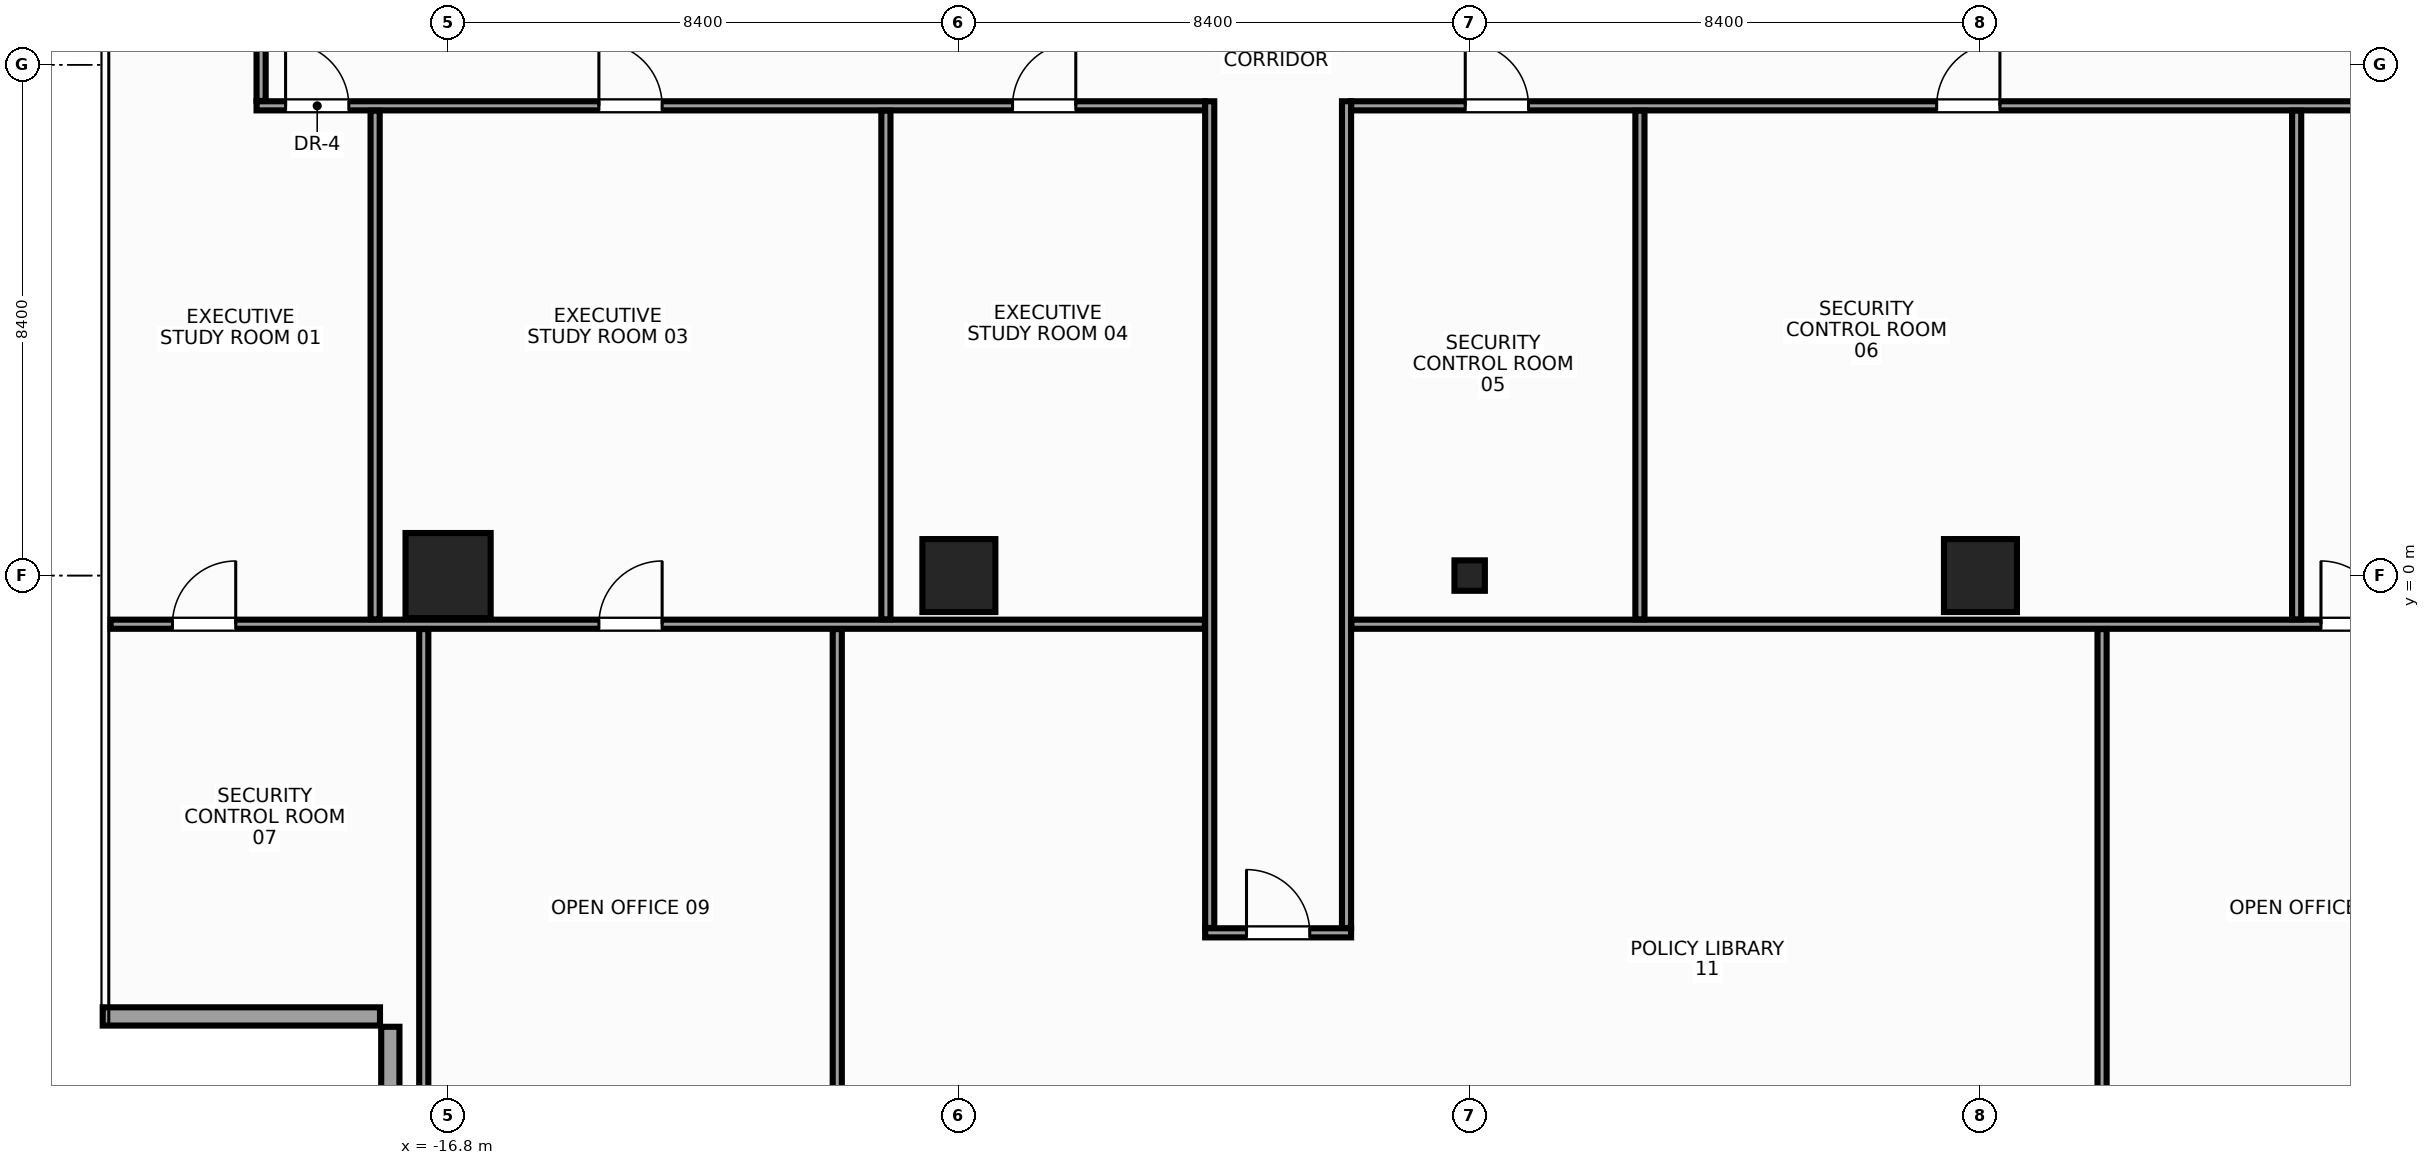
"""IFC4 building model, lengths in metres.
Left out: names, types, materials, properties, quantities, classifications, styles, units other than length and angle.
Written with IfcOpenShell. Run it as: python <this file> out.ifc"""

import sys

from ifc_helpers import new_model, si_unit, direction, frame, frame_2d, origin, origin_with_axes, origin_2d, place, context, subcontext, project, spatial, rectangle, hollow_rectangle, extrude, source, transform, mapped, element, fill, save


model = new_model("IFC4")
c1 = context("Model", 3, precision=1e-05, world=origin(), true_north=direction((0.0, 1.0)))
c2 = subcontext(c1, "Body", "Model", "MODEL_VIEW")
j1 = project(units=[si_unit("LENGTHUNIT", "METRE"), si_unit("PLANEANGLEUNIT", "RADIAN")], contexts=[c1])
p1 = place(None, origin())
s1 = spatial("IfcSite", under=j1, at=p1, CompositionType="ELEMENT")
p2 = place(p1, origin())
s2 = spatial("IfcBuilding", under=s1, at=p2, CompositionType="ELEMENT")
p3 = place(p2, frame((0.0, 0.0, 250.4)))
s3 = spatial("IfcBuildingStorey", under=s2, at=p3, CompositionType="ELEMENT", Elevation=250.4)
m1 = source(origin(), c2, "Body", "SweptSolid", [
    extrude(rectangle(XDim=1.4, YDim=1.4, at=origin_2d()), origin(), (0.0, 0.0, 1.0), 3.6),
])
p4 = place(p3, frame((-16.8, 0.0, 0.0), z_axis=(0.0, 0.0, 1.0), x_axis=(1.0, 0.0, 0.0)))
e1 = element("IfcColumn", 1, at=p4, inside=s3, PredefinedType="COLUMN", context=c2, shape_type="MappedRepresentation", body=[
    mapped(m1, transform((0.0, 0.0, 0.0), x_axis=(1.0, 0.0, 0.0), y_axis=(0.0, 1.0, 0.0), z_axis=(0.0, 0.0, 1.0), scale=1.0)),
])
m2 = source(origin(), c2, "Body", "SweptSolid", [
    extrude(rectangle(XDim=1.2, YDim=1.2, at=origin_2d()), origin(), (0.0, 0.0, 1.0), 3.6),
])
for number, where, z_axis, x_axis in (
    (2, (-8.4, 0.0, 0.0), (0.0, 0.0, 1.0), (1.0, 0.0, 0.0)),
    (3, (8.4, 0.0, 0.0), (0.0, 0.0, 1.0), (1.0, 0.0, 0.0)),
):
    element("IfcColumn", number, at=place(p3, frame(where, z_axis=z_axis, x_axis=x_axis)), inside=s3, PredefinedType="COLUMN", context=c2, shape_type="MappedRepresentation", body=[
        mapped(m2, transform((0.0, 0.0, 0.0), x_axis=(1.0, 0.0, 0.0), y_axis=(0.0, 1.0, 0.0), z_axis=(0.0, 0.0, 1.0), scale=1.0)),
    ])
m3 = source(origin(), c2, "Body", "SweptSolid", [
    extrude(hollow_rectangle(XDim=0.5, YDim=0.5, WallThickness=0.025, at=origin_2d()), origin(), (0.0, 0.0, 1.0), 3.6),
])
p5 = place(p3, origin_with_axes())
e4 = element("IfcColumn", 4, at=p5, inside=s3, PredefinedType="COLUMN", context=c2, shape_type="MappedRepresentation", body=[
    mapped(m3, transform((0.0, 0.0, 0.0), x_axis=(1.0, 0.0, 0.0), y_axis=(0.0, 1.0, 0.0), z_axis=(0.0, 0.0, 1.0), scale=1.0)),
])
m4 = source(origin(), c2, "Body", "SweptSolid", [
    extrude(rectangle(XDim=4.56, YDim=0.3, at=frame_2d((2.28, 0.0))), origin(), (0.0, 0.0, 1.0), 2.75),
])
for number, where, z_axis, x_axis in (
    (5, (-22.48, -7.25, 0.0), (0.0, 0.0, 1.0), (1.0, 0.0, 0.0)),
    (6, (-17.75, -7.42, 0.0), (0.0, 0.0, 1.0), (0.0, -1.0, 0.0)),
):
    element("IfcWall", number, at=place(p3, frame(where, z_axis=z_axis, x_axis=x_axis)), inside=s3, PredefinedType="STANDARD", context=c2, shape_type="MappedRepresentation", body=[
        mapped(m4, transform((0.0, 0.0, 0.0), x_axis=(1.0, 0.0, 0.0), y_axis=(0.0, 1.0, 0.0), z_axis=(0.0, 0.0, 1.0), scale=1.0)),
    ])
m5 = source(origin(), c2, "Body", "SweptSolid", [
    extrude(rectangle(XDim=15.6, YDim=0.15, at=frame_2d((7.8, 0.0))), origin(), (0.0, 0.0, 1.0), 2.755),
])
p6 = place(p3, frame((-19.95, 7.725, 0.0), z_axis=(0.0, 0.0, 1.0), x_axis=(1.0, 0.0, 0.0)))
e7 = element("IfcWall", 7, at=p6, inside=s3, PredefinedType="PARTITIONING", context=c2, shape_type="MappedRepresentation", body=[
    mapped(m5, transform((0.0, 0.0, 0.0), x_axis=(1.0, 0.0, 0.0), y_axis=(0.0, 1.0, 0.0), z_axis=(0.0, 0.0, 1.0), scale=1.0)),
])
p7 = place(p6, frame((0.478, 0.0, 0.0)))
e8 = element("IfcOpeningElement", 8, at=p7, cuts=e7, PredefinedType="OPENING", context=c2, shape_type="SweptSolid", body=[
    extrude(rectangle(XDim=1.04, YDim=2.2, at=frame_2d((0.52, 1.1))), frame((0.0, 0.087, 0.0), z_axis=(0.0, -1.0, 0.0), x_axis=(1.0, 0.0, 0.0)), (0.0, 0.0, 1.0), 0.174),
])
p8 = place(p6, frame((5.63, 0.0, 0.0)))
e9 = element("IfcOpeningElement", 9, at=p8, cuts=e7, PredefinedType="OPENING", context=c2, shape_type="SweptSolid", body=[
    extrude(rectangle(XDim=1.04, YDim=2.2, at=frame_2d((0.52, 1.1))), frame((0.0, 0.087, 0.0), z_axis=(0.0, -1.0, 0.0), x_axis=(1.0, 0.0, 0.0)), (0.0, 0.0, 1.0), 0.174),
])
p9 = place(p6, frame((12.433, 0.0, 0.0)))
e10 = element("IfcOpeningElement", 10, at=p9, cuts=e7, PredefinedType="OPENING", context=c2, shape_type="SweptSolid", body=[
    extrude(rectangle(XDim=1.04, YDim=2.2, at=frame_2d((0.52, 1.1))), frame((0.0, 0.087, 0.0), z_axis=(0.0, -1.0, 0.0), x_axis=(1.0, 0.0, 0.0)), (0.0, 0.0, 1.0), 0.174),
])
m6 = source(origin(), c2, "Body", "SweptSolid", [
    extrude(rectangle(XDim=21.9, YDim=0.15, at=frame_2d((10.95, 0.0))), origin(), (0.0, 0.0, 1.0), 2.755),
])
p10 = place(p3, frame((-1.95, 7.725, 0.0), z_axis=(0.0, 0.0, 1.0), x_axis=(1.0, 0.0, 0.0)))
e11 = element("IfcWall", 11, at=p10, inside=s3, PredefinedType="PARTITIONING", context=c2, shape_type="MappedRepresentation", body=[
    mapped(m6, transform((0.0, 0.0, 0.0), x_axis=(1.0, 0.0, 0.0), y_axis=(0.0, 1.0, 0.0), z_axis=(0.0, 0.0, 1.0), scale=1.0)),
])
p11 = place(p10, frame((17.742, 0.0, 0.0)))
e12 = element("IfcOpeningElement", 12, at=p11, cuts=e11, PredefinedType="OPENING", context=c2, shape_type="SweptSolid", body=[
    extrude(rectangle(XDim=1.04, YDim=2.2, at=frame_2d((0.52, 1.1))), frame((0.0, 0.087, 0.0), z_axis=(0.0, -1.0, 0.0), x_axis=(1.0, 0.0, 0.0)), (0.0, 0.0, 1.0), 0.174),
])
p12 = place(p10, frame((1.877, 0.0, 0.0)))
e13 = element("IfcOpeningElement", 13, at=p12, cuts=e11, PredefinedType="OPENING", context=c2, shape_type="SweptSolid", body=[
    extrude(rectangle(XDim=1.04, YDim=2.2, at=frame_2d((0.52, 1.1))), frame((0.0, 0.087, 0.0), z_axis=(0.0, -1.0, 0.0), x_axis=(1.0, 0.0, 0.0)), (0.0, 0.0, 1.0), 0.174),
])
p13 = place(p10, frame((9.63, 0.0, 0.0)))
e14 = element("IfcOpeningElement", 14, at=p13, cuts=e11, PredefinedType="OPENING", context=c2, shape_type="SweptSolid", body=[
    extrude(rectangle(XDim=1.04, YDim=2.2, at=frame_2d((0.52, 1.1))), frame((0.0, 0.087, 0.0), z_axis=(0.0, -1.0, 0.0), x_axis=(1.0, 0.0, 0.0)), (0.0, 0.0, 1.0), 0.174),
])
m7 = source(origin(), c2, "Body", "SweptSolid", [
    extrude(rectangle(XDim=2.4, YDim=0.15, at=frame_2d((1.2, 0.0))), origin(), (0.0, 0.0, 1.0), 3.37),
])
p14 = place(p3, frame((-4.35, -5.875, 0.0), z_axis=(0.0, 0.0, 1.0), x_axis=(1.0, 0.0, 0.0)))
e15 = element("IfcWall", 15, at=p14, inside=s3, PredefinedType="PARTITIONING", context=c2, shape_type="MappedRepresentation", body=[
    mapped(m7, transform((0.0, 0.0, 0.0), x_axis=(1.0, 0.0, 0.0), y_axis=(0.0, 1.0, 0.0), z_axis=(0.0, 0.0, 1.0), scale=1.0)),
])
p15 = place(p14, frame((0.68, 0.0, 0.0)))
e16 = element("IfcOpeningElement", 16, at=p15, cuts=e15, PredefinedType="OPENING", context=c2, shape_type="SweptSolid", body=[
    extrude(rectangle(XDim=1.04, YDim=2.2, at=frame_2d((0.52, 1.1))), frame((0.0, 0.087, 0.0), z_axis=(0.0, -1.0, 0.0), x_axis=(1.0, 0.0, 0.0)), (0.0, 0.0, 1.0), 0.174),
])
m8 = source(origin(), c2, "Body", "SweptSolid", [
    extrude(rectangle(XDim=2.115, YDim=0.15, at=frame_2d((1.058, 0.0))), origin(), (0.0, 0.0, 1.0), 3.37),
])
p16 = place(p3, frame((-19.875, 7.805, 0.0), z_axis=(0.0, 0.0, 1.0), x_axis=(0.0, 1.0, 0.0)))
e17 = element("IfcWall", 17, at=p16, inside=s3, PredefinedType="PARTITIONING", context=c2, shape_type="MappedRepresentation", body=[
    mapped(m8, transform((0.0, 0.0, 0.0), x_axis=(1.0, 0.0, 0.0), y_axis=(0.0, 1.0, 0.0), z_axis=(0.0, 0.0, 1.0), scale=1.0)),
])
m9 = source(origin(), c2, "Body", "SweptSolid", [
    extrude(rectangle(XDim=13.595, YDim=0.15, at=frame_2d((6.797, 0.0))), origin(), (0.0, 0.0, 1.0), 2.655),
])
for number, where, z_axis, x_axis in (
    (18, (-4.275, -5.795, 0.0), (0.0, 0.0, 1.0), (0.0, 1.0, 0.0)),
    (19, (-2.025, -5.795, 0.0), (0.0, 0.0, 1.0), (0.0, 1.0, 0.0)),
):
    element("IfcWall", number, at=place(p3, frame(where, z_axis=z_axis, x_axis=x_axis)), inside=s3, PredefinedType="PARTITIONING", context=c2, shape_type="MappedRepresentation", body=[
        mapped(m9, transform((0.0, 0.0, 0.0), x_axis=(1.0, 0.0, 0.0), y_axis=(0.0, 1.0, 0.0), z_axis=(0.0, 0.0, 1.0), scale=1.0)),
    ])
m10 = source(origin(), c2, "Body", "SweptSolid", [
    extrude(rectangle(XDim=17.995, YDim=0.15, at=frame_2d((8.998, 0.0))), origin(), (0.0, 0.0, 1.0), 2.755),
])
p17 = place(p3, frame((-22.35, -0.8, 0.0), z_axis=(0.0, 0.0, 1.0), x_axis=(1.0, 0.0, 0.0)))
e20 = element("IfcWall", 20, at=p17, inside=s3, PredefinedType="PARTITIONING", context=c2, shape_type="MappedRepresentation", body=[
    mapped(m10, transform((0.0, 0.0, 0.0), x_axis=(1.0, 0.0, 0.0), y_axis=(0.0, 1.0, 0.0), z_axis=(0.0, 0.0, 1.0), scale=1.0)),
])
p18 = place(p17, frame((1.018, 0.0, 0.0)))
e21 = element("IfcOpeningElement", 21, at=p18, cuts=e20, PredefinedType="OPENING", context=c2, shape_type="SweptSolid", body=[
    extrude(rectangle(XDim=1.04, YDim=2.2, at=frame_2d((0.52, 1.1))), frame((0.0, 0.087, 0.0), z_axis=(0.0, -1.0, 0.0), x_axis=(1.0, 0.0, 0.0)), (0.0, 0.0, 1.0), 0.174),
])
p19 = place(p17, frame((8.03, 0.0, 0.0)))
e22 = element("IfcOpeningElement", 22, at=p19, cuts=e20, PredefinedType="OPENING", context=c2, shape_type="SweptSolid", body=[
    extrude(rectangle(XDim=1.04, YDim=2.2, at=frame_2d((0.52, 1.1))), frame((0.0, 0.087, 0.0), z_axis=(0.0, -1.0, 0.0), x_axis=(1.0, 0.0, 0.0)), (0.0, 0.0, 1.0), 0.174),
])
m11 = source(origin(), c2, "Body", "SweptSolid", [
    extrude(rectangle(XDim=24.295, YDim=0.15, at=frame_2d((12.147, 0.0))), origin(), (0.0, 0.0, 1.0), 2.755),
])
p20 = place(p3, frame((-1.945, -0.8, 0.0), z_axis=(0.0, 0.0, 1.0), x_axis=(1.0, 0.0, 0.0)))
e23 = element("IfcWall", 23, at=p20, inside=s3, PredefinedType="PARTITIONING", context=c2, shape_type="MappedRepresentation", body=[
    mapped(m11, transform((0.0, 0.0, 0.0), x_axis=(1.0, 0.0, 0.0), y_axis=(0.0, 1.0, 0.0), z_axis=(0.0, 0.0, 1.0), scale=1.0)),
])
p21 = place(p20, frame((22.278, 0.0, 0.0)))
e24 = element("IfcOpeningElement", 24, at=p21, cuts=e23, PredefinedType="OPENING", context=c2, shape_type="SweptSolid", body=[
    extrude(rectangle(XDim=1.04, YDim=2.2, at=frame_2d((0.52, 1.1))), frame((0.0, 0.087, 0.0), z_axis=(0.0, -1.0, 0.0), x_axis=(1.0, 0.0, 0.0)), (0.0, 0.0, 1.0), 0.174),
])
p22 = place(p20, frame((15.945, 0.0, 0.0)))
e25 = element("IfcOpeningElement", 25, at=p22, cuts=e23, PredefinedType="OPENING", context=c2, shape_type="SweptSolid", body=[
    extrude(rectangle(XDim=1.04, YDim=2.2, at=frame_2d((0.52, 1.1))), frame((0.0, 0.087, 0.0), z_axis=(0.0, -1.0, 0.0), x_axis=(1.0, 0.0, 0.0)), (0.0, 0.0, 1.0), 0.174),
])
m12 = source(origin(), c2, "Body", "SweptSolid", [
    extrude(rectangle(XDim=8.365, YDim=0.15, at=frame_2d((4.183, 0.0))), origin(), (0.0, 0.0, 1.0), 3.37),
])
p23 = place(p3, frame((-18.0, -0.72, 0.0), z_axis=(0.0, 0.0, 1.0), x_axis=(0.0, 1.0, 0.0)))
e26 = element("IfcWall", 26, at=p23, inside=s3, PredefinedType="PARTITIONING", context=c2, shape_type="MappedRepresentation", body=[
    mapped(m12, transform((0.0, 0.0, 0.0), x_axis=(1.0, 0.0, 0.0), y_axis=(0.0, 1.0, 0.0), z_axis=(0.0, 0.0, 1.0), scale=1.0)),
])
m13 = source(origin(), c2, "Body", "SweptSolid", [
    extrude(rectangle(XDim=8.365, YDim=0.15, at=frame_2d((4.183, 0.0))), origin(), (0.0, 0.0, 1.0), 2.655),
])
for number, where, z_axis, x_axis in (
    (27, (-9.6, -0.72, 0.0), (0.0, 0.0, 1.0), (0.0, 1.0, 0.0)),
    (28, (2.8, -0.72, 0.0), (0.0, 0.0, 1.0), (0.0, 1.0, 0.0)),
    (29, (13.6, -0.72, 0.0), (0.0, 0.0, 1.0), (0.0, 1.0, 0.0)),
):
    element("IfcWall", number, at=place(p3, frame(where, z_axis=z_axis, x_axis=x_axis)), inside=s3, PredefinedType="PARTITIONING", context=c2, shape_type="MappedRepresentation", body=[
        mapped(m13, transform((0.0, 0.0, 0.0), x_axis=(1.0, 0.0, 0.0), y_axis=(0.0, 1.0, 0.0), z_axis=(0.0, 0.0, 1.0), scale=1.0)),
    ])
m14 = source(origin(), c2, "Body", "SweptSolid", [
    extrude(rectangle(XDim=9.21, YDim=0.15, at=frame_2d((4.605, 0.0))), origin(), (0.0, 0.0, 1.0), 3.37),
])
p24 = place(p3, frame((-17.2, -10.09, 0.0), z_axis=(0.0, 0.0, 1.0), x_axis=(0.0, 1.0, 0.0)))
e30 = element("IfcWall", 30, at=p24, inside=s3, PredefinedType="PARTITIONING", context=c2, shape_type="MappedRepresentation", body=[
    mapped(m14, transform((0.0, 0.0, 0.0), x_axis=(1.0, 0.0, 0.0), y_axis=(0.0, 1.0, 0.0), z_axis=(0.0, 0.0, 1.0), scale=1.0)),
])
m15 = source(origin(), c2, "Body", "SweptSolid", [
    extrude(rectangle(XDim=10.97, YDim=0.15, at=frame_2d((5.485, 0.0))), origin(), (0.0, 0.0, 1.0), 2.905),
])
for number, where, z_axis, x_axis in (
    (31, (-10.4, -11.85, 0.0), (0.0, 0.0, 1.0), (0.0, 1.0, 0.0)),
    (32, (10.4, -11.85, 0.0), (0.0, 0.0, 1.0), (0.0, 1.0, 0.0)),
):
    element("IfcWall", number, at=place(p3, frame(where, z_axis=z_axis, x_axis=x_axis)), inside=s3, PredefinedType="PARTITIONING", context=c2, shape_type="MappedRepresentation", body=[
        mapped(m15, transform((0.0, 0.0, 0.0), x_axis=(1.0, 0.0, 0.0), y_axis=(0.0, 1.0, 0.0), z_axis=(0.0, 0.0, 1.0), scale=1.0)),
    ])
m16 = source(origin(), c2, "Body", "SweptSolid", [
    extrude(rectangle(XDim=1.04, YDim=2.2, at=frame_2d((0.52, 1.1))), frame((0.0, 0.025, 0.0), z_axis=(0.0, -1.0, 0.0), x_axis=(1.0, 0.0, 0.0)), (0.0, 0.0, 1.0), 0.05),
])
p25 = place(p7, origin())
e33 = element("IfcDoor", 33, at=p25, inside=s3, OperationType="SINGLE_SWING_LEFT", PredefinedType="DOOR", context=c2, shape_type="MappedRepresentation", body=[
    mapped(m16, transform((0.0, 0.0, 0.0), x_axis=(1.0, 0.0, 0.0), y_axis=(0.0, 1.0, 0.0), z_axis=(0.0, 0.0, 1.0), scale=1.0)),
])
fill(e8, e33)
p26 = place(p8, origin())
e34 = element("IfcDoor", 34, at=p26, inside=s3, OperationType="SINGLE_SWING_LEFT", PredefinedType="DOOR", context=c2, shape_type="MappedRepresentation", body=[
    mapped(m16, transform((0.0, 0.0, 0.0), x_axis=(1.0, 0.0, 0.0), y_axis=(0.0, 1.0, 0.0), z_axis=(0.0, 0.0, 1.0), scale=1.0)),
])
fill(e9, e34)
p27 = place(p9, origin())
e35 = element("IfcDoor", 35, at=p27, inside=s3, OperationType="SINGLE_SWING_RIGHT", PredefinedType="DOOR", context=c2, shape_type="MappedRepresentation", body=[
    mapped(m16, transform((0.0, 0.0, 0.0), x_axis=(1.0, 0.0, 0.0), y_axis=(0.0, 1.0, 0.0), z_axis=(0.0, 0.0, 1.0), scale=1.0)),
])
fill(e10, e35)
p28 = place(p12, origin())
e36 = element("IfcDoor", 36, at=p28, inside=s3, OperationType="SINGLE_SWING_LEFT", PredefinedType="DOOR", context=c2, shape_type="MappedRepresentation", body=[
    mapped(m16, transform((0.0, 0.0, 0.0), x_axis=(1.0, 0.0, 0.0), y_axis=(0.0, 1.0, 0.0), z_axis=(0.0, 0.0, 1.0), scale=1.0)),
])
fill(e13, e36)
p29 = place(p13, origin())
e37 = element("IfcDoor", 37, at=p29, inside=s3, OperationType="SINGLE_SWING_RIGHT", PredefinedType="DOOR", context=c2, shape_type="MappedRepresentation", body=[
    mapped(m16, transform((0.0, 0.0, 0.0), x_axis=(1.0, 0.0, 0.0), y_axis=(0.0, 1.0, 0.0), z_axis=(0.0, 0.0, 1.0), scale=1.0)),
])
fill(e14, e37)
p30 = place(p15, origin())
e38 = element("IfcDoor", 38, at=p30, inside=s3, OperationType="SINGLE_SWING_LEFT", PredefinedType="DOOR", context=c2, shape_type="MappedRepresentation", body=[
    mapped(m16, transform((0.0, 0.0, 0.0), x_axis=(1.0, 0.0, 0.0), y_axis=(0.0, 1.0, 0.0), z_axis=(0.0, 0.0, 1.0), scale=1.0)),
])
fill(e16, e38)
p31 = place(p18, origin())
e39 = element("IfcDoor", 39, at=p31, inside=s3, OperationType="SINGLE_SWING_RIGHT", PredefinedType="DOOR", context=c2, shape_type="MappedRepresentation", body=[
    mapped(m16, transform((0.0, 0.0, 0.0), x_axis=(1.0, 0.0, 0.0), y_axis=(0.0, 1.0, 0.0), z_axis=(0.0, 0.0, 1.0), scale=1.0)),
])
fill(e21, e39)
p32 = place(p19, origin())
e40 = element("IfcDoor", 40, at=p32, inside=s3, OperationType="SINGLE_SWING_RIGHT", PredefinedType="DOOR", context=c2, shape_type="MappedRepresentation", body=[
    mapped(m16, transform((0.0, 0.0, 0.0), x_axis=(1.0, 0.0, 0.0), y_axis=(0.0, 1.0, 0.0), z_axis=(0.0, 0.0, 1.0), scale=1.0)),
])
fill(e22, e40)
p33 = place(p22, origin())
e41 = element("IfcDoor", 41, at=p33, inside=s3, OperationType="SINGLE_SWING_LEFT", PredefinedType="DOOR", context=c2, shape_type="MappedRepresentation", body=[
    mapped(m16, transform((0.0, 0.0, 0.0), x_axis=(1.0, 0.0, 0.0), y_axis=(0.0, 1.0, 0.0), z_axis=(0.0, 0.0, 1.0), scale=1.0)),
])
fill(e25, e41)
save(model, sys.argv[1])
